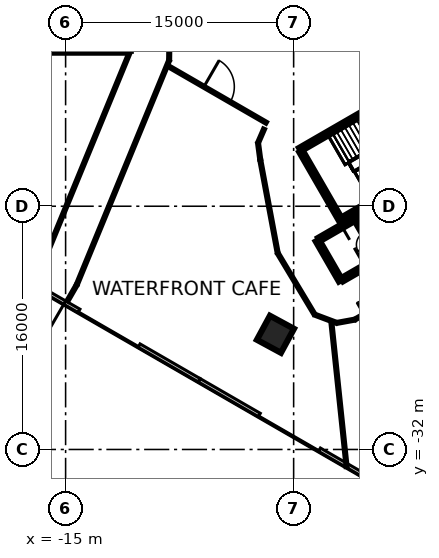
"""IFC4 building model, lengths in metres.
Left out: names, types, materials, properties, quantities, classifications, styles, units other than length and angle.
Written with IfcOpenShell. Run it as: python <this file> out.ifc"""

import sys

from ifc_helpers import new_model, si_unit, direction, frame, frame_2d, origin, origin_2d, place, context, subcontext, project, spatial, rectangle, extrude, element, fill, save


model = new_model("IFC4")
c1 = context("Model", 3, precision=1e-05, world=origin(), true_north=direction((0.0, 1.0)))
c2 = subcontext(c1, "Body", "Model", "MODEL_VIEW")
j1 = project(units=[si_unit("LENGTHUNIT", "METRE"), si_unit("PLANEANGLEUNIT", "RADIAN")], contexts=[c1])
p1 = place(None, origin())
s1 = spatial("IfcSite", under=j1, at=p1, CompositionType="ELEMENT")
p2 = place(p1, origin())
s2 = spatial("IfcBuilding", under=s1, at=p2, CompositionType="ELEMENT")
p3 = place(p2, origin())
s3 = spatial("IfcBuildingStorey", under=s2, at=p3, CompositionType="ELEMENT", Elevation=0.0)
p4 = place(p3, frame((-1.197, -24.423, -0.45), z_axis=(0.0, 0.0, 1.0), x_axis=(0.476198301069, 0.879337920289, 0.0)))
e1 = element("IfcColumn", 1, at=p4, inside=s3, PredefinedType="COLUMN", context=c2, shape_type="SweptSolid", body=[
    extrude(rectangle(XDim=1.8, YDim=1.8, at=origin_2d()), origin(), (0.0, 0.0, 1.0), 5.15),
])
p5 = place(p3, frame((-14.119, -22.881, 0.0), z_axis=(0.0, 0.0, 1.0), x_axis=(-0.866023543838, 0.500003221507, 0.0)))
e2 = element("IfcWall", 2, at=p5, inside=s3, PredefinedType="SOLIDWALL", context=c2, shape_type="SweptSolid", body=[
    extrude(rectangle(XDim=4.566, YDim=0.25, at=frame_2d((2.283, 0.0))), origin(), (0.0, 0.0, 1.0), 7.1),
])
p6 = place(p5, frame((1.083, 0.0, 0.0)))
e3 = element("IfcOpeningElement", 3, at=p6, cuts=e2, PredefinedType="OPENING", context=c2, shape_type="SweptSolid", body=[
    extrude(rectangle(XDim=2.4, YDim=2.4, at=frame_2d((1.2, 1.2))), frame((0.0, 0.135, 0.0), z_axis=(0.0, -1.0, 0.0), x_axis=(1.0, 0.0, 0.0)), (0.0, 0.0, 1.0), 0.27),
])
p7 = place(p3, frame((-6.21, -27.447, 0.0), z_axis=(0.0, 0.0, 1.0), x_axis=(-0.866046694585, 0.499963121439, 0.0)))
e4 = element("IfcWall", 4, at=p7, inside=s3, PredefinedType="SOLIDWALL", context=c2, shape_type="SweptSolid", body=[
    extrude(rectangle(XDim=4.566, YDim=0.25, at=frame_2d((2.283, 0.0))), origin(), (0.0, 0.0, 1.0), 7.1),
])
p8 = place(p3, frame((-2.256, -29.73, 0.0), z_axis=(0.0, 0.0, 1.0), x_axis=(-0.866023543838, 0.500003221507, 0.0)))
e5 = element("IfcWall", 5, at=p8, inside=s3, PredefinedType="SOLIDWALL", context=c2, shape_type="SweptSolid", body=[
    extrude(rectangle(XDim=4.566, YDim=0.25, at=frame_2d((2.283, 0.0))), origin(), (0.0, 0.0, 1.0), 7.1),
])
p9 = place(p3, frame((5.653, -34.297, 0.0), z_axis=(0.0, 0.0, 1.0), x_axis=(-0.866010176527, 0.500026373457, 0.0)))
e6 = element("IfcWall", 6, at=p9, inside=s3, PredefinedType="SOLIDWALL", context=c2, shape_type="SweptSolid", body=[
    extrude(rectangle(XDim=4.566, YDim=0.25, at=frame_2d((2.283, 0.0))), origin(), (0.0, 0.0, 1.0), 7.1),
])
p10 = place(p3, frame((-10.963, -5.775, 0.0), z_axis=(0.0, 0.0, 1.0), x_axis=(-1.0, 0.0, 0.0)))
e7 = element("IfcWall", 7, at=p10, inside=s3, PredefinedType="SHEAR", context=c2, shape_type="SweptSolid", body=[
    extrude(rectangle(XDim=5.225, YDim=0.25, at=frame_2d((2.612, 0.0))), origin(), (0.0, 0.0, 1.0), 7.1),
])
p11 = place(p3, frame((0.417, -12.273, 0.0), z_axis=(0.0, 0.0, 1.0), x_axis=(0.866021906294, 0.500006057782, 0.0)))
e8 = element("IfcWall", 8, at=p11, inside=s3, PredefinedType="SHEAR", context=c2, shape_type="SweptSolid", body=[
    extrude(rectangle(XDim=11.55, YDim=0.25, at=frame_2d((5.775, 0.0))), origin(), (0.0, 0.0, 1.0), 7.1),
])
p12 = place(p11, frame((10.025, 0.0, 0.0)))
e9 = element("IfcOpeningElement", 9, at=p12, cuts=e8, PredefinedType="OPENING", context=c2, shape_type="SweptSolid", body=[
    extrude(rectangle(XDim=1.2, YDim=2.1, at=frame_2d((0.6, 1.05))), frame((0.0, 0.135, 0.0), z_axis=(0.0, -1.0, 0.0), x_axis=(1.0, 0.0, 0.0)), (0.0, 0.0, 1.0), 0.27),
])
p13 = place(p11, frame((8.725, 0.0, 0.0)))
e10 = element("IfcOpeningElement", 10, at=p13, cuts=e8, PredefinedType="OPENING", context=c2, shape_type="SweptSolid", body=[
    extrude(rectangle(XDim=1.2, YDim=2.1, at=frame_2d((0.6, 1.05))), frame((0.0, 0.135, 0.0), z_axis=(0.0, -1.0, 0.0), x_axis=(1.0, 0.0, 0.0)), (0.0, 0.0, 1.0), 0.27),
])
p14 = place(p3, frame((3.235, -17.153, 0.0), z_axis=(0.0, 0.0, 1.0), x_axis=(-0.500008851346, 0.866020293397, 0.0)))
e11 = element("IfcWall", 11, at=p14, inside=s3, PredefinedType="SHEAR", context=c2, shape_type="SweptSolid", body=[
    extrude(rectangle(XDim=5.51, YDim=0.25, at=frame_2d((2.755, 0.0))), origin(), (0.0, 0.0, 1.0), 7.1),
])
p15 = place(p3, frame((3.085, -20.894, 0.0), z_axis=(0.0, 0.0, 1.0), x_axis=(-0.499978833458, 0.866037623948, 0.0)))
e12 = element("IfcWall", 12, at=p15, inside=s3, PredefinedType="SHEAR", context=c2, shape_type="SweptSolid", body=[
    extrude(rectangle(XDim=3.05, YDim=0.25, at=frame_2d((1.525, 0.0))), origin(), (0.0, 0.0, 1.0), 7.1),
])
p16 = place(p3, frame((1.669, -18.19, 0.0), z_axis=(0.0, 0.0, 1.0), x_axis=(0.866042235819, 0.499970844928, 0.0)))
e13 = element("IfcWall", 13, at=p16, inside=s3, PredefinedType="SHEAR", context=c2, shape_type="SweptSolid", body=[
    extrude(rectangle(XDim=2.865, YDim=0.25, at=frame_2d((1.432, 0.0))), origin(), (0.0, 0.0, 1.0), 7.1),
])
p17 = place(p3, frame((5.675, -19.399, 0.0), z_axis=(0.0, 0.0, 1.0), x_axis=(-0.866026637627, -0.499997862916, 0.0)))
e14 = element("IfcWall", 14, at=p17, inside=s3, PredefinedType="SHEAR", context=c2, shape_type="SweptSolid", body=[
    extrude(rectangle(XDim=2.865, YDim=0.25, at=frame_2d((1.432, 0.0))), origin(), (0.0, 0.0, 1.0), 7.1),
])
p18 = place(p3, frame((4.414, -16.276, 0.0), z_axis=(0.0, 0.0, 1.0), x_axis=(0.500003324108, -0.866023484601, 0.0)))
e15 = element("IfcWall", 15, at=p18, inside=s3, PredefinedType="SHEAR", context=c2, shape_type="SweptSolid", body=[
    extrude(rectangle(XDim=3.085, YDim=0.25, at=frame_2d((1.542, 0.0))), origin(), (0.0, 0.0, 1.0), 7.1),
])
p19 = place(p3, frame((5.322, -15.619, 0.0), z_axis=(0.0, 0.0, 1.0), x_axis=(-0.866026229868, -0.499998569178, 0.0)))
e16 = element("IfcWall", 16, at=p19, inside=s3, PredefinedType="SHEAR", context=c2, shape_type="SweptSolid", body=[
    extrude(rectangle(XDim=2.449, YDim=0.25, at=frame_2d((1.225, 0.0))), origin(), (0.0, 0.0, 1.0), 7.1),
])
p20 = place(p3, frame((4.145, -16.749, 0.0), z_axis=(0.0, 0.0, 1.0), x_axis=(0.866185586049, 0.49972245349, 0.0)))
e17 = element("IfcWall", 17, at=p20, inside=s3, PredefinedType="SHEAR", context=c2, shape_type="SweptSolid", body=[
    extrude(rectangle(XDim=0.344, YDim=0.25, at=frame_2d((0.172, 0.0))), origin(), (0.0, 0.0, 1.0), 7.1),
])
p21 = place(p3, frame((5.503, -19.352, 0.0), z_axis=(0.0, 0.0, 1.0), x_axis=(-0.499986818241, 0.866033014143, 0.0)))
e18 = element("IfcWall", 18, at=p21, inside=s3, PredefinedType="SHEAR", context=c2, shape_type="SweptSolid", body=[
    extrude(rectangle(XDim=2.798, YDim=0.2, at=frame_2d((1.399, 0.0))), origin(), (0.0, 0.0, 1.0), 7.1),
])
p22 = place(p21, frame((0.949, 0.0, 0.0)))
e19 = element("IfcOpeningElement", 19, at=p22, cuts=e18, PredefinedType="OPENING", context=c2, shape_type="SweptSolid", body=[
    extrude(rectangle(XDim=0.9, YDim=2.1, at=frame_2d((0.45, 1.05))), frame((0.0, 0.11, 0.0), z_axis=(0.0, -1.0, 0.0), x_axis=(1.0, 0.0, 0.0)), (0.0, 0.0, 1.0), 0.22),
])
p23 = place(p3, frame((-16.602, -20.015, 0.0), z_axis=(0.0, 0.0, 1.0), x_axis=(0.380627809016, 0.924728322808, 0.0)))
e20 = element("IfcWall", 20, at=p23, inside=s3, PredefinedType="PARTITIONING", context=c2, shape_type="SweptSolid", body=[
    extrude(rectangle(XDim=15.199, YDim=0.2, at=frame_2d((7.6, 0.0))), origin(), (0.0, 0.0, 1.0), 4.7),
])
p24 = place(p3, frame((-14.908, -22.281, 0.0), z_axis=(0.0, 0.0, 1.0), x_axis=(0.499223722114, 0.866473124384, 0.0)))
e21 = element("IfcWall", 21, at=p24, inside=s3, PredefinedType="PARTITIONING", context=c2, shape_type="SweptSolid", body=[
    extrude(rectangle(XDim=1.286, YDim=0.2, at=frame_2d((0.643, 0.0))), origin(), (0.0, 0.0, 1.0), 7.1),
])
p25 = place(p3, frame((-14.266, -21.167, 0.0), z_axis=(0.0, 0.0, 1.0), x_axis=(0.380713644122, 0.924692987526, 0.0)))
e22 = element("IfcWall", 22, at=p25, inside=s3, PredefinedType="PARTITIONING", context=c2, shape_type="SweptSolid", body=[
    extrude(rectangle(XDim=15.96, YDim=0.2, at=frame_2d((7.98, 0.0))), origin(), (0.0, 0.0, 1.0), 4.7),
])
p26 = place(p3, frame((-8.19, -6.409, 0.0), z_axis=(0.0, 0.0, 1.0), x_axis=(0.012522499567, 0.999921590428, 0.0)))
e23 = element("IfcWall", 23, at=p26, inside=s3, PredefinedType="PARTITIONING", context=c2, shape_type="SweptSolid", body=[
    extrude(rectangle(XDim=3.509, YDim=0.2, at=frame_2d((1.755, 0.0))), origin(), (0.0, 0.0, 1.0), 7.1),
])
p27 = place(p3, frame((-8.321, -6.743, 0.0), z_axis=(0.0, 0.0, 1.0), x_axis=(0.8660028672, -0.500039032478, 0.0)))
e24 = element("IfcWall", 24, at=p27, inside=s3, PredefinedType="PARTITIONING", context=c2, shape_type="SweptSolid", body=[
    extrude(rectangle(XDim=7.588, YDim=0.2, at=frame_2d((3.794, 0.0))), origin(), (0.0, 0.0, 1.0), 7.1),
])
p28 = place(p27, frame((2.794, 0.0, 0.0)))
e25 = element("IfcOpeningElement", 25, at=p28, cuts=e24, PredefinedType="OPENING", context=c2, shape_type="SweptSolid", body=[
    extrude(rectangle(XDim=2.0, YDim=2.1, at=frame_2d((1.0, 1.05))), frame((0.0, 0.11, 0.0), z_axis=(0.0, -1.0, 0.0), x_axis=(1.0, 0.0, 0.0)), (0.0, 0.0, 1.0), 0.22),
])
p29 = place(p3, frame((-2.342, -11.835, 0.0), z_axis=(0.0, 0.0, 1.0), x_axis=(0.130834272089, -0.991404253192, 0.0)))
e26 = element("IfcWall", 26, at=p29, inside=s3, PredefinedType="PARTITIONING", context=c2, shape_type="SweptSolid", body=[
    extrude(rectangle(XDim=1.131, YDim=0.2, at=frame_2d((0.565, 0.0))), origin(), (0.0, 0.0, 1.0), 7.1),
])
p30 = place(p3, frame((-2.34, -11.829, 0.0), z_axis=(0.0, 0.0, 1.0), x_axis=(0.39787014305, 0.917441741621, 0.0)))
e27 = element("IfcWall", 27, at=p30, inside=s3, PredefinedType="PARTITIONING", context=c2, shape_type="SweptSolid", body=[
    extrude(rectangle(XDim=1.043, YDim=0.2, at=frame_2d((0.521, 0.0))), origin(), (0.0, 0.0, 1.0), 7.1),
])
p31 = place(p3, frame((-2.194, -12.957, 0.0), z_axis=(0.0, 0.0, 1.0), x_axis=(0.183815239544, -0.98296081189, 0.0)))
e28 = element("IfcWall", 28, at=p31, inside=s3, PredefinedType="PARTITIONING", context=c2, shape_type="SweptSolid", body=[
    extrude(rectangle(XDim=6.229, YDim=0.2, at=frame_2d((3.115, 0.0))), origin(), (0.0, 0.0, 1.0), 7.1),
])
p32 = place(p3, frame((-1.046, -19.087, 0.0), z_axis=(0.0, 0.0, 1.0), x_axis=(0.515112605672, -0.857122513692, 0.0)))
e29 = element("IfcWall", 29, at=p32, inside=s3, PredefinedType="PARTITIONING", context=c2, shape_type="SweptSolid", body=[
    extrude(rectangle(XDim=4.713, YDim=0.2, at=frame_2d((2.357, 0.0))), origin(), (0.0, 0.0, 1.0), 7.1),
])
p33 = place(p3, frame((1.391, -23.133, 0.0), z_axis=(0.0, 0.0, 1.0), x_axis=(0.936212023637, -0.351435693688, 0.0)))
e30 = element("IfcWall", 30, at=p33, inside=s3, PredefinedType="PARTITIONING", context=c2, shape_type="SweptSolid", body=[
    extrude(rectangle(XDim=1.542, YDim=0.2, at=frame_2d((0.771, 0.0))), origin(), (0.0, 0.0, 1.0), 7.1),
])
p34 = place(p3, frame((2.474, -23.543, 0.0), z_axis=(0.0, 0.0, 1.0), x_axis=(0.10461532009, -0.994512762514, 0.0)))
e31 = element("IfcWall", 31, at=p34, inside=s3, PredefinedType="PARTITIONING", context=c2, shape_type="SweptSolid", body=[
    extrude(rectangle(XDim=9.697, YDim=0.2, at=frame_2d((4.848, 0.0))), origin(), (0.0, 0.0, 1.0), 4.7),
])
p35 = place(p3, frame((2.838, -23.675, 0.0), z_axis=(0.0, 0.0, 1.0), x_axis=(0.983748481543, 0.179552012136, 0.0)))
e32 = element("IfcWall", 32, at=p35, inside=s3, PredefinedType="PARTITIONING", context=c2, shape_type="SweptSolid", body=[
    extrude(rectangle(XDim=1.192, YDim=0.2, at=frame_2d((0.596, 0.0))), origin(), (0.0, 0.0, 1.0), 7.1),
])
p36 = place(p3, frame((4.022, -23.458, 0.0), z_axis=(0.0, 0.0, 1.0), x_axis=(0.867379634497, 0.497647033208, 0.0)))
e33 = element("IfcWall", 33, at=p36, inside=s3, PredefinedType="PARTITIONING", context=c2, shape_type="SweptSolid", body=[
    extrude(rectangle(XDim=2.283, YDim=0.2, at=frame_2d((1.141, 0.0))), origin(), (0.0, 0.0, 1.0), 7.1),
])
p37 = place(p36, frame((0.691, 0.0, 0.0)))
e34 = element("IfcOpeningElement", 34, at=p37, cuts=e33, PredefinedType="OPENING", context=c2, shape_type="SweptSolid", body=[
    extrude(rectangle(XDim=0.9, YDim=2.1, at=frame_2d((0.45, 1.05))), frame((0.0, 0.11, 0.0), z_axis=(0.0, -1.0, 0.0), x_axis=(1.0, 0.0, 0.0)), (0.0, 0.0, 1.0), 0.22),
])
p38 = place(p6, origin())
e35 = element("IfcDoor", 35, at=p38, inside=s3, OperationType="DOUBLE_DOOR_DOUBLE_SWING", PredefinedType="DOOR", context=c2, shape_type="SweptSolid", body=[
    extrude(rectangle(XDim=2.4, YDim=2.4, at=frame_2d((1.2, 1.2))), frame((0.0, 0.025, 0.0), z_axis=(0.0, -1.0, 0.0), x_axis=(1.0, 0.0, 0.0)), (0.0, 0.0, 1.0), 0.05),
])
fill(e3, e35)
p39 = place(p28, frame((2.0, 0.0, 0.0), z_axis=(0.0, 0.0, 1.0), x_axis=(-1.0, 0.0, 0.0)))
e36 = element("IfcDoor", 36, at=p39, inside=s3, OperationType="DOUBLE_DOOR_SINGLE_SWING", PredefinedType="DOOR", context=c2, shape_type="SweptSolid", body=[
    extrude(rectangle(XDim=2.0, YDim=2.1, at=frame_2d((1.0, 1.05))), frame((0.0, 0.025, 0.0), z_axis=(0.0, -1.0, 0.0), x_axis=(1.0, 0.0, 0.0)), (0.0, 0.0, 1.0), 0.05),
])
fill(e25, e36)
save(model, sys.argv[1])
